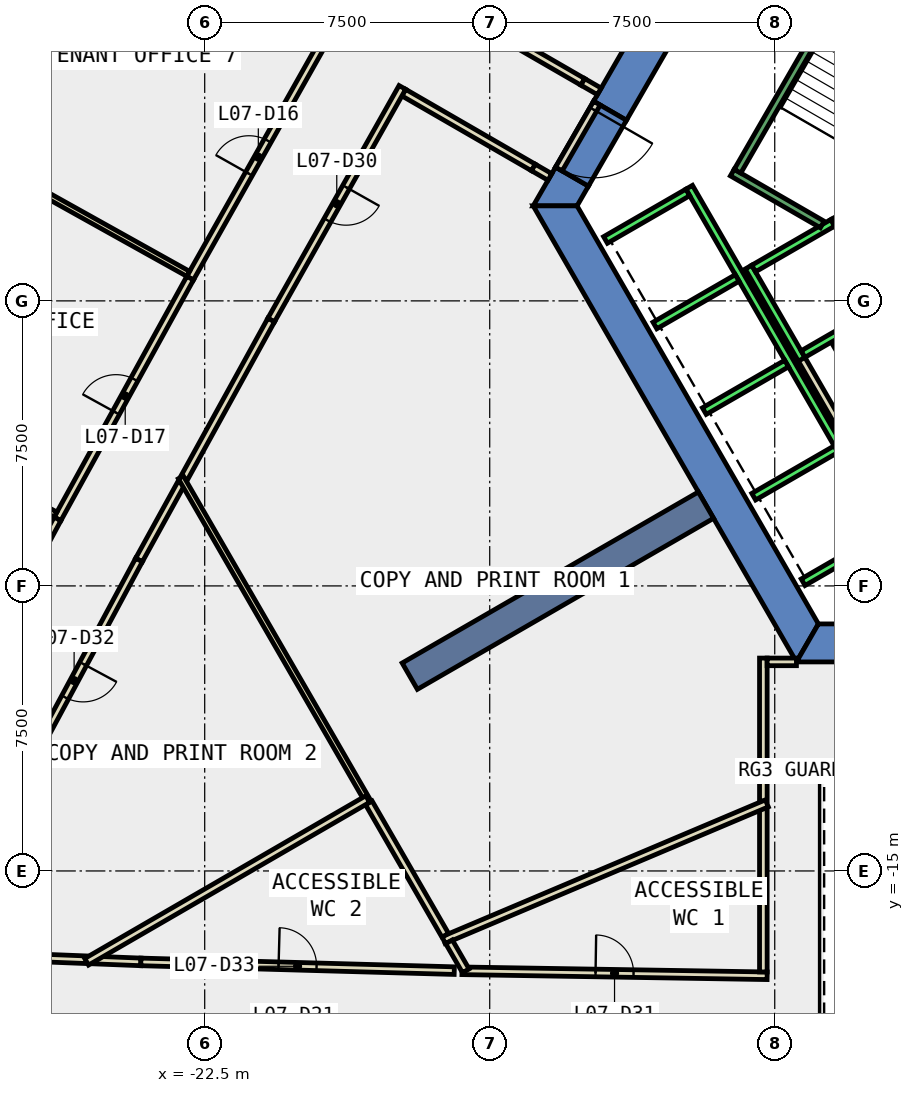
"""IFC4 building model, lengths in metres.
Left out: names, types, materials, properties, quantities, classifications, styles, units other than length and angle.
Written with IfcOpenShell. Run it as: python <this file> out.ifc"""

import sys

from ifc_helpers import new_model, si_unit, direction, frame, frame_2d, origin, place, context, subcontext, project, spatial, polyline, rectangle, outline, extrude, element, fill, save


model = new_model("IFC4")
c1 = context("Model", 3, precision=1e-05, world=origin(), true_north=direction((0.0, 1.0)))
c2 = subcontext(c1, "Body", "Model", "MODEL_VIEW")
j1 = project(units=[si_unit("LENGTHUNIT", "METRE"), si_unit("PLANEANGLEUNIT", "RADIAN")], contexts=[c1])
p1 = place(None, origin())
s1 = spatial("IfcSite", under=j1, at=p1, CompositionType="ELEMENT")
p2 = place(p1, origin())
s2 = spatial("IfcBuilding", under=s1, at=p2, CompositionType="ELEMENT")
p3 = place(p2, frame((0.0, 0.0, 39.2)))
s3 = spatial("IfcBuildingStorey", under=s2, at=p3, CompositionType="ELEMENT", Elevation=39.2)
p4 = place(p3, frame((0.0, 0.0, -0.4)))
e1 = element("IfcWall", 1, at=p4, inside=s3, PredefinedType="SHEAR", context=c2, shape_type="SweptSolid", body=[
    extrude(outline(polyline([(-12.267, 5.252), (-11.402, 4.752), (-6.351, 13.5), (-6.928, 14.5), (-12.267, 5.252)])), origin(), (0.0, 0.0, 1.0), 4.2),
])
p5 = place(p3, frame((0.0, 0.0, -0.4)))
e2 = element("IfcWall", 2, at=p5, inside=s3, PredefinedType="SHEAR", context=c2, shape_type="SweptSolid", body=[
    extrude(outline(polyline([(-12.402, 3.02), (-13.267, 3.52), (-13.856, 2.5), (-12.702, 2.5), (-12.402, 3.02)])), origin(), (0.0, 0.0, 1.0), 4.2),
])
p6 = place(p3, frame((0.0, 0.0, 3.6)))
e3 = element("IfcWall", 3, at=p6, inside=s3, PredefinedType="SHEAR", context=c2, shape_type="SweptSolid", body=[
    extrude(outline(polyline([(-13.267, 3.52), (-12.402, 3.02), (-11.402, 4.752), (-12.267, 5.252), (-13.267, 3.52)])), origin(), (0.0, 0.0, 1.0), 0.2),
])
p7 = place(p3, frame((0.0, 0.0, -0.4)))
e4 = element("IfcWall", 4, at=p7, inside=s3, PredefinedType="SHEAR", context=c2, shape_type="SweptSolid", body=[
    extrude(outline(polyline([(-13.856, 2.5), (-6.928, -9.5), (-6.351, -8.5), (-12.702, 2.5), (-13.856, 2.5)])), origin(), (0.0, 0.0, 1.0), 4.2),
])
p8 = place(p3, frame((0.0, 0.0, -0.4)))
e5 = element("IfcWall", 5, at=p8, inside=s3, PredefinedType="SHEAR", context=c2, shape_type="SweptSolid", body=[
    extrude(outline(polyline([(3.75, -9.5), (3.75, -8.5), (-6.351, -8.5), (-6.928, -9.5), (3.75, -9.5)])), origin(), (0.0, 0.0, 1.0), 4.2),
])
p9 = place(p3, frame((-9.31, -5.375, -0.4), z_axis=(0.0, 0.0, 1.0), x_axis=(-0.866017533419, -0.500013631625, 0.0)))
e6 = element("IfcWall", 6, at=p9, inside=s3, PredefinedType="SHEAR", context=c2, shape_type="SweptSolid", body=[
    extrude(rectangle(XDim=9.0, YDim=0.8, at=frame_2d((4.5, 0.0))), origin(), (0.0, 0.0, 1.0), 4.2),
])
p10 = place(p3, frame((-15.963, 7.733, 0.0), z_axis=(0.0, 0.0, 1.0), x_axis=(0.865965832374, -0.500103166518, 0.0)))
e7 = element("IfcWall", 7, at=p10, inside=s3, PredefinedType="PARTITIONING", context=c2, shape_type="SweptSolid", body=[
    extrude(rectangle(XDim=3.941, YDim=0.2, at=frame_2d((1.971, 0.0))), origin(), (0.0, 0.0, 1.0), 3.8),
])
p11 = place(p3, frame((-17.261, 5.48, 0.0), z_axis=(0.0, 0.0, 1.0), x_axis=(0.865949187497, -0.500131987253, 0.0)))
e8 = element("IfcWall", 8, at=p11, inside=s3, PredefinedType="PARTITIONING", context=c2, shape_type="SweptSolid", body=[
    extrude(rectangle(XDim=3.939, YDim=0.2, at=frame_2d((1.969, 0.0))), origin(), (0.0, 0.0, 1.0), 3.8),
])
p12 = place(p3, frame((-17.299, 5.617, 0.0), z_axis=(0.0, 0.0, 1.0), x_axis=(-0.491166441632, -0.871065741844, 0.0)))
e9 = element("IfcWall", 9, at=p12, inside=s3, PredefinedType="PARTITIONING", context=c2, shape_type="SweptSolid", body=[
    extrude(rectangle(XDim=7.028, YDim=0.2, at=frame_2d((3.514, 0.0))), origin(), (0.0, 0.0, 1.0), 3.8),
])
p13 = place(p12, frame((3.014, 0.0, 0.0)))
e10 = element("IfcOpeningElement", 10, at=p13, cuts=e9, PredefinedType="OPENING", context=c2, shape_type="SweptSolid", body=[
    extrude(rectangle(XDim=1.0, YDim=2.1, at=frame_2d((0.5, 1.05))), frame((0.0, 0.11, 0.0), z_axis=(0.0, -1.0, 0.0), x_axis=(1.0, 0.0, 0.0)), (0.0, 0.0, 1.0), 0.22),
])
p14 = place(p3, frame((-20.751, -0.505, 0.0), z_axis=(0.0, 0.0, 1.0), x_axis=(-0.482566110981, -0.875859548405, 0.0)))
e11 = element("IfcWall", 11, at=p14, inside=s3, PredefinedType="PARTITIONING", context=c2, shape_type="SweptSolid", body=[
    extrude(rectangle(XDim=4.748, YDim=0.2, at=frame_2d((2.374, 0.0))), origin(), (0.0, 0.0, 1.0), 3.8),
])
p15 = place(p3, frame((-15.73, -17.627, 0.0), z_axis=(0.0, 0.0, 1.0), x_axis=(0.999866746812, -0.016324479129, 0.0)))
e12 = element("IfcWall", 12, at=p15, inside=s3, PredefinedType="PARTITIONING", context=c2, shape_type="SweptSolid", body=[
    extrude(rectangle(XDim=8.031, YDim=0.2, at=frame_2d((4.016, 0.0))), origin(), (0.0, 0.0, 1.0), 3.8),
])
p16 = place(p15, frame((3.515, 0.0, 0.0)))
e13 = element("IfcOpeningElement", 13, at=p16, cuts=e12, PredefinedType="OPENING", context=c2, shape_type="SweptSolid", body=[
    extrude(rectangle(XDim=1.0, YDim=2.1, at=frame_2d((0.5, 1.05))), frame((0.0, 0.11, 0.0), z_axis=(0.0, -1.0, 0.0), x_axis=(1.0, 0.0, 0.0)), (0.0, 0.0, 1.0), 0.22),
])
p17 = place(p3, frame((-23.114, -4.794, 0.0), z_axis=(0.0, 0.0, 1.0), x_axis=(-0.482482362329, -0.875905685586, 0.0)))
e14 = element("IfcWall", 14, at=p17, inside=s3, PredefinedType="PARTITIONING", context=c2, shape_type="SweptSolid", body=[
    extrude(rectangle(XDim=2.311, YDim=0.2, at=frame_2d((1.156, 0.0))), origin(), (0.0, 0.0, 1.0), 3.8),
])
p18 = place(p3, frame((-24.229, -6.818, 0.0), z_axis=(0.0, 0.0, 1.0), x_axis=(-0.473714049803, -0.88067871498, 0.0)))
e15 = element("IfcWall", 15, at=p18, inside=s3, PredefinedType="PARTITIONING", context=c2, shape_type="SweptSolid", body=[
    extrude(rectangle(XDim=7.209, YDim=0.2, at=frame_2d((3.604, 0.0))), origin(), (0.0, 0.0, 1.0), 3.8),
])
p19 = place(p18, frame((3.104, 0.0, 0.0)))
e16 = element("IfcOpeningElement", 16, at=p19, cuts=e15, PredefinedType="OPENING", context=c2, shape_type="SweptSolid", body=[
    extrude(rectangle(XDim=1.0, YDim=2.1, at=frame_2d((0.5, 1.05))), frame((0.0, 0.11, 0.0), z_axis=(0.0, -1.0, 0.0), x_axis=(1.0, 0.0, 0.0)), (0.0, 0.0, 1.0), 0.22),
])
p20 = place(p3, frame((-29.639, -17.178, 0.0), z_axis=(0.0, 0.0, 1.0), x_axis=(0.999228076722, -0.039284229546, 0.0)))
e17 = element("IfcWall", 17, at=p20, inside=s3, PredefinedType="PARTITIONING", context=c2, shape_type="SweptSolid", body=[
    extrude(rectangle(XDim=4.021, YDim=0.2, at=frame_2d((2.01, 0.0))), origin(), (0.0, 0.0, 1.0), 3.8),
])
p21 = place(p3, frame((-25.421, -17.344, 0.0), z_axis=(0.0, 0.0, 1.0), x_axis=(0.999219068508, -0.039512695804, 0.0)))
e18 = element("IfcWall", 18, at=p21, inside=s3, PredefinedType="PARTITIONING", context=c2, shape_type="SweptSolid", body=[
    extrude(rectangle(XDim=1.242, YDim=0.2, at=frame_2d((0.621, 0.0))), origin(), (0.0, 0.0, 1.0), 3.8),
])
p22 = place(p3, frame((-24.18, -17.393, 0.0), z_axis=(0.0, 0.0, 1.0), x_axis=(0.999611380121, -0.02787631132, 0.0)))
e19 = element("IfcWall", 19, at=p22, inside=s3, PredefinedType="PARTITIONING", context=c2, shape_type="SweptSolid", body=[
    extrude(rectangle(XDim=8.25, YDim=0.2, at=frame_2d((4.125, 0.0))), origin(), (0.0, 0.0, 1.0), 3.8),
])
p23 = place(p22, frame((3.625, 0.0, 0.0)))
e20 = element("IfcOpeningElement", 20, at=p23, cuts=e19, PredefinedType="OPENING", context=c2, shape_type="SweptSolid", body=[
    extrude(rectangle(XDim=1.0, YDim=2.1, at=frame_2d((0.5, 1.05))), frame((0.0, 0.11, 0.0), z_axis=(0.0, -1.0, 0.0), x_axis=(1.0, 0.0, 0.0)), (0.0, 0.0, 1.0), 0.22),
])
p24 = place(p3, frame((-22.884, 0.598, 0.0), z_axis=(0.0, 0.0, 1.0), x_axis=(0.491206176175, 0.871043335597, 0.0)))
e21 = element("IfcWall", 21, at=p24, inside=s3, PredefinedType="PARTITIONING", context=c2, shape_type="SweptSolid", body=[
    extrude(rectangle(XDim=7.309, YDim=0.2, at=frame_2d((3.654, 0.0))), origin(), (0.0, 0.0, 1.0), 3.8),
])
p25 = place(p24, frame((3.154, 0.0, 0.0)))
e22 = element("IfcOpeningElement", 22, at=p25, cuts=e21, PredefinedType="OPENING", context=c2, shape_type="SweptSolid", body=[
    extrude(rectangle(XDim=1.0, YDim=2.1, at=frame_2d((0.5, 1.05))), frame((0.0, 0.11, 0.0), z_axis=(0.0, -1.0, 0.0), x_axis=(1.0, 0.0, 0.0)), (0.0, 0.0, 1.0), 0.22),
])
p26 = place(p3, frame((-26.373, -5.736, 0.0), z_axis=(0.0, 0.0, 1.0), x_axis=(0.482587313112, 0.875847866483, 0.0)))
e23 = element("IfcWall", 23, at=p26, inside=s3, PredefinedType="PARTITIONING", context=c2, shape_type="SweptSolid", body=[
    extrude(rectangle(XDim=7.232, YDim=0.2, at=frame_2d((3.616, 0.0))), origin(), (0.0, 0.0, 1.0), 3.8),
])
p27 = place(p26, frame((3.191, 0.0, 0.0)))
e24 = element("IfcOpeningElement", 24, at=p27, cuts=e23, PredefinedType="OPENING", context=c2, shape_type="SweptSolid", body=[
    extrude(rectangle(XDim=1.0, YDim=2.1, at=frame_2d((0.5, 1.05))), frame((0.0, 0.11, 0.0), z_axis=(0.0, -1.0, 0.0), x_axis=(1.0, 0.0, 0.0)), (0.0, 0.0, 1.0), 0.22),
])
p28 = place(p3, frame((-29.799, -12.106, 0.0), z_axis=(0.0, 0.0, 1.0), x_axis=(0.473681086062, 0.880696445268, 0.0)))
e25 = element("IfcWall", 25, at=p28, inside=s3, PredefinedType="PARTITIONING", context=c2, shape_type="SweptSolid", body=[
    extrude(rectangle(XDim=7.233, YDim=0.2, at=frame_2d((3.616, 0.0))), origin(), (0.0, 0.0, 1.0), 3.8),
])
p29 = place(p28, frame((3.191, 0.0, 0.0)))
e26 = element("IfcOpeningElement", 26, at=p29, cuts=e25, PredefinedType="OPENING", context=c2, shape_type="SweptSolid", body=[
    extrude(rectangle(XDim=1.0, YDim=2.1, at=frame_2d((0.5, 1.05))), frame((0.0, 0.11, 0.0), z_axis=(0.0, -1.0, 0.0), x_axis=(1.0, 0.0, 0.0)), (0.0, 0.0, 1.0), 0.22),
])
p30 = place(p3, frame((-5.126, -2.422, 0.0), z_axis=(0.0, 0.0, 1.0), x_axis=(-0.500062241894, 0.865989465428, 0.0)))
e27 = element("IfcWall", 27, at=p30, inside=s3, PredefinedType="PARTITIONING", context=c2, shape_type="SweptSolid", body=[
    extrude(rectangle(XDim=1.7, YDim=0.2, at=frame_2d((0.85, 0.0))), origin(), (0.0, 0.0, 1.0), 3.8),
])
p31 = place(p3, frame((-5.492, -3.788, 0.0), z_axis=(0.0, 0.0, 1.0), x_axis=(-0.500008949224, 0.866020236886, 0.0)))
e28 = element("IfcWall", 28, at=p31, inside=s3, PredefinedType="PARTITIONING", context=c2, shape_type="SweptSolid", body=[
    extrude(rectangle(XDim=2.68, YDim=0.2, at=frame_2d((1.34, 0.0))), origin(), (0.0, 0.0, 1.0), 3.8),
])
p32 = place(p3, frame((-7.8, -13.161, 0.0), z_axis=(0.0, 0.0, 1.0), x_axis=(0.0, 1.0, 0.0)))
e29 = element("IfcWall", 29, at=p32, inside=s3, PredefinedType="PARTITIONING", context=c2, shape_type="SweptSolid", body=[
    extrude(rectangle(XDim=3.762, YDim=0.2, at=frame_2d((1.881, 0.0))), origin(), (0.0, 0.0, 1.0), 3.8),
])
p33 = place(p3, frame((-7.7, -9.499, 0.0), z_axis=(0.0, 0.0, 1.0), x_axis=(1.0, 0.0, 0.0)))
e30 = element("IfcWall", 30, at=p33, inside=s3, PredefinedType="PARTITIONING", context=c2, shape_type="SweptSolid", body=[
    extrude(rectangle(XDim=0.771, YDim=0.2, at=frame_2d((0.385, 0.0))), origin(), (0.0, 0.0, 1.0), 3.8),
])
p34 = place(p3, frame((-7.8, -17.657, 0.0), z_axis=(0.0, 0.0, 1.0), x_axis=(0.0, 1.0, 0.0)))
e31 = element("IfcWall", 31, at=p34, inside=s3, PredefinedType="PARTITIONING", context=c2, shape_type="SweptSolid", body=[
    extrude(rectangle(XDim=4.296, YDim=0.2, at=frame_2d((2.148, 0.0))), origin(), (0.0, 0.0, 1.0), 3.8),
])
p35 = place(p3, frame((-7.708, -13.222, 0.0), z_axis=(0.0, 0.0, 1.0), x_axis=(-0.921093468555, -0.389341523839, 0.0)))
e32 = element("IfcWall", 32, at=p35, inside=s3, PredefinedType="PARTITIONING", context=c2, shape_type="SweptSolid", body=[
    extrude(rectangle(XDim=9.233, YDim=0.2, at=frame_2d((4.617, 0.0))), origin(), (0.0, 0.0, 1.0), 3.8),
])
p36 = place(p3, frame((-18.182, -13.207, 0.0), z_axis=(0.0, 0.0, 1.0), x_axis=(-0.500081416649, 0.865978392757, 0.0)))
e33 = element("IfcWall", 33, at=p36, inside=s3, PredefinedType="PARTITIONING", context=c2, shape_type="SweptSolid", body=[
    extrude(rectangle(XDim=9.89, YDim=0.15, at=frame_2d((4.945, 0.0))), origin(), (0.0, 0.0, 1.0), 3.8),
])
p37 = place(p3, frame((-16.171, -16.692, 0.0), z_axis=(0.0, 0.0, 1.0), x_axis=(-0.499813503007, 0.866133051102, 0.0)))
e34 = element("IfcWall", 34, at=p37, inside=s3, PredefinedType="PARTITIONING", context=c2, shape_type="SweptSolid", body=[
    extrude(rectangle(XDim=4.023, YDim=0.2, at=frame_2d((2.012, 0.0))), origin(), (0.0, 0.0, 1.0), 3.8),
])
p38 = place(p3, frame((-15.63, -17.628, 0.0), z_axis=(0.0, 0.0, 1.0), x_axis=(-0.500577563191, 0.865691690632, 0.0)))
e35 = element("IfcWall", 35, at=p38, inside=s3, PredefinedType="PARTITIONING", context=c2, shape_type="SweptSolid", body=[
    extrude(rectangle(XDim=0.881, YDim=0.2, at=frame_2d((0.441, 0.0))), origin(), (0.0, 0.0, 1.0), 3.8),
])
p39 = place(p3, frame((-18.211, -13.108, 0.0), z_axis=(0.0, 0.0, 1.0), x_axis=(-0.865421721769, -0.501044153235, 0.0)))
e36 = element("IfcWall", 36, at=p39, inside=s3, PredefinedType="PARTITIONING", context=c2, shape_type="SweptSolid", body=[
    extrude(rectangle(XDim=8.546, YDim=0.2, at=frame_2d((4.273, 0.0))), origin(), (0.0, 0.0, 1.0), 3.8),
])
p40 = place(p3, frame((-22.935, 0.712, 0.0), z_axis=(0.0, 0.0, 1.0), x_axis=(-0.873395616379, 0.487011393389, 0.0)))
e37 = element("IfcWall", 37, at=p40, inside=s3, PredefinedType="PARTITIONING", context=c2, shape_type="SweptSolid", body=[
    extrude(rectangle(XDim=6.48, YDim=0.15, at=frame_2d((3.24, 0.0))), origin(), (0.0, 0.0, 1.0), 3.8),
])
p41 = place(p3, frame((-26.425, -5.623, 0.0), z_axis=(0.0, 0.0, 1.0), x_axis=(-0.87825523631, 0.478192157919, 0.0)))
e38 = element("IfcWall", 38, at=p41, inside=s3, PredefinedType="PARTITIONING", context=c2, shape_type="SweptSolid", body=[
    extrude(rectangle(XDim=6.481, YDim=0.15, at=frame_2d((3.24, 0.0))), origin(), (0.0, 0.0, 1.0), 3.8),
])
p42 = place(p3, frame((-12.18, 5.202, 0.0), z_axis=(0.0, 0.0, 1.0), x_axis=(-0.50002537861, -0.866010750942, 0.0)))
e39 = element("IfcWall", 39, at=p42, inside=s3, PredefinedType="PARTITIONING", context=c2, shape_type="SweptSolid", body=[
    extrude(rectangle(XDim=2.0, YDim=0.2, at=frame_2d((1.0, 0.0))), origin(), (0.0, 0.0, 1.0), 2.4),
])
p43 = place(p42, frame((0.19, 0.0, 0.0)))
e40 = element("IfcOpeningElement", 40, at=p43, cuts=e39, PredefinedType="OPENING", context=c2, shape_type="SweptSolid", body=[
    extrude(rectangle(XDim=1.8, YDim=2.1, at=frame_2d((0.9, 1.05))), frame((0.0, 0.11, 0.0), z_axis=(0.0, -1.0, 0.0), x_axis=(1.0, 0.0, 0.0)), (0.0, 0.0, 1.0), 0.22),
])
for number, where, z_axis, x_axis in (
    (41, (-12.55, 5.762, 0.0), (0.0, 0.0, 1.0), (0.866, -0.5, 0.0)),
    (42, (-13.85, 3.51, 0.0), (0.0, 0.0, 1.0), (0.866, -0.5, 0.0)),
):
    element("IfcWall", number, at=place(p3, frame(where, z_axis=z_axis, x_axis=x_axis)), inside=s3, PredefinedType="PARTITIONING", context=c2, shape_type="SweptSolid", body=[
        extrude(rectangle(XDim=0.5, YDim=0.2, at=frame_2d((0.25, 0.0))), origin(), (0.0, 0.0, 1.0), 2.4),
    ])
p44 = place(p3, frame((-5.94, 2.188, 0.0), z_axis=(0.0, 0.0, 1.0), x_axis=(0.49994636267, -0.866056369097, 0.0)))
e43 = element("IfcWall", 43, at=p44, inside=s3, PredefinedType="STANDARD", context=c2, shape_type="SweptSolid", body=[
    extrude(rectangle(XDim=2.8, YDim=0.2, at=frame_2d((1.4, 0.0))), origin(), (0.0, 0.0, 1.0), 3.8),
])
p45 = place(p44, frame((1.225, 0.0, 0.0)))
e44 = element("IfcOpeningElement", 44, at=p45, cuts=e43, PredefinedType="OPENING", context=c2, shape_type="SweptSolid", body=[
    extrude(rectangle(XDim=1.1, YDim=2.1, at=frame_2d((0.55, 1.05))), frame((0.0, 0.11, 0.0), z_axis=(0.0, -1.0, 0.0), x_axis=(1.0, 0.0, 0.0)), (0.0, 0.0, 1.0), 0.22),
])
p46 = place(p3, frame((-8.192, 0.888, 0.0), z_axis=(0.0, 0.0, 1.0), x_axis=(0.49994636267, -0.866056369097, 0.0)))
e45 = element("IfcWall", 45, at=p46, inside=s3, PredefinedType="STANDARD", context=c2, shape_type="SweptSolid", body=[
    extrude(rectangle(XDim=2.8, YDim=0.2, at=frame_2d((1.4, 0.0))), origin(), (0.0, 0.0, 1.0), 3.8),
])
for number, where, z_axis, x_axis in (
    (46, (-5.977, 2.052, 0.0), (0.0, 0.0, 1.0), (-0.866, -0.5, 0.0)),
    (47, (-4.677, -0.2, 0.0), (0.0, 0.0, 1.0), (-0.866, -0.5, 0.0)),
):
    element("IfcWall", number, at=place(p3, frame(where, z_axis=z_axis, x_axis=x_axis)), inside=s3, PredefinedType="STANDARD", context=c2, shape_type="SweptSolid", body=[
        extrude(rectangle(XDim=2.399, YDim=0.2, at=frame_2d((1.2, 0.0))), origin(), (0.0, 0.0, 1.0), 3.8),
    ])
p47 = place(p3, frame((-9.751, 2.99, 0.0), z_axis=(0.0, 0.0, 1.0), x_axis=(0.50000090737, -0.866024879913, 0.0)))
e48 = element("IfcWall", 48, at=p47, inside=s3, PredefinedType="STANDARD", context=c2, shape_type="SweptSolid", body=[
    extrude(rectangle(XDim=10.6, YDim=0.2, at=frame_2d((5.3, 0.0))), origin(), (0.0, 0.0, 1.0), 3.8),
])
p48 = place(p3, frame((-9.788, 2.853, 0.0), z_axis=(0.0, 0.0, 1.0), x_axis=(-0.865998541277, -0.500046524342, 0.0)))
e49 = element("IfcWall", 49, at=p48, inside=s3, PredefinedType="STANDARD", context=c2, shape_type="SweptSolid", body=[
    extrude(rectangle(XDim=2.5, YDim=0.2, at=frame_2d((1.25, 0.0))), origin(), (0.0, 0.0, 1.0), 3.8),
])
for number, where, z_axis, x_axis in (
    (50, (-8.488, 0.602, 0.0), (0.0, 0.0, 1.0), (-0.866, -0.5, 0.0)),
    (51, (-7.188, -1.65, 0.0), (0.0, 0.0, 1.0), (-0.866, -0.5, 0.0)),
    (52, (-5.888, -3.902, 0.0), (0.0, 0.0, 1.0), (-0.866, -0.5, 0.0)),
    (53, (-4.588, -6.153, 0.0), (0.0, 0.0, 1.0), (-0.866, -0.5, 0.0)),
):
    element("IfcWall", number, at=place(p3, frame(where, z_axis=z_axis, x_axis=x_axis)), inside=s3, PredefinedType="STANDARD", context=c2, shape_type="SweptSolid", body=[
        extrude(rectangle(XDim=2.5, YDim=0.2, at=frame_2d((1.25, 0.0))), origin(), (0.0, 0.0, 1.0), 3.8),
    ])
p49 = place(p3, frame((-6.25, 2.01, 0.0), z_axis=(0.0, 0.0, 1.0), x_axis=(-0.86611865017, 0.499838457731, 0.0)))
e54 = element("IfcWall", 54, at=p49, inside=s3, PredefinedType="STANDARD", context=c2, shape_type="SweptSolid", body=[
    extrude(rectangle(XDim=2.733, YDim=0.2, at=frame_2d((1.366, 0.0))), origin(), (0.0, 0.0, 1.0), 3.8),
])
p50 = place(p3, frame((-5.03, 9.388, 0.0), z_axis=(0.0, 0.0, 1.0), x_axis=(-0.499978703459, -0.866037698999, 0.0)))
e55 = element("IfcWall", 55, at=p50, inside=s3, PredefinedType="STANDARD", context=c2, shape_type="SweptSolid", body=[
    extrude(rectangle(XDim=6.9, YDim=0.2, at=frame_2d((3.45, 0.0))), origin(), (0.0, 0.0, 1.0), 3.8),
])
p51 = place(p25, origin())
e56 = element("IfcDoor", 56, at=p51, inside=s3, OperationType="SINGLE_SWING_RIGHT", PredefinedType="DOOR", context=c2, shape_type="SweptSolid", body=[
    extrude(rectangle(XDim=1.0, YDim=2.1, at=frame_2d((0.5, 1.05))), frame((0.0, 0.025, 0.0), z_axis=(0.0, -1.0, 0.0), x_axis=(1.0, 0.0, 0.0)), (0.0, 0.0, 1.0), 0.05),
])
fill(e22, e56)
p52 = place(p27, origin())
e57 = element("IfcDoor", 57, at=p52, inside=s3, OperationType="SINGLE_SWING_LEFT", PredefinedType="DOOR", context=c2, shape_type="SweptSolid", body=[
    extrude(rectangle(XDim=1.0, YDim=2.1, at=frame_2d((0.5, 1.05))), frame((0.0, 0.025, 0.0), z_axis=(0.0, -1.0, 0.0), x_axis=(1.0, 0.0, 0.0)), (0.0, 0.0, 1.0), 0.05),
])
fill(e24, e57)
p53 = place(p13, origin())
e58 = element("IfcDoor", 58, at=p53, inside=s3, OperationType="SINGLE_SWING_RIGHT", PredefinedType="DOOR", context=c2, shape_type="SweptSolid", body=[
    extrude(rectangle(XDim=1.0, YDim=2.1, at=frame_2d((0.5, 1.05))), frame((0.0, 0.025, 0.0), z_axis=(0.0, -1.0, 0.0), x_axis=(1.0, 0.0, 0.0)), (0.0, 0.0, 1.0), 0.05),
])
fill(e10, e58)
p54 = place(p16, origin())
e59 = element("IfcDoor", 59, at=p54, inside=s3, OperationType="SINGLE_SWING_LEFT", PredefinedType="DOOR", context=c2, shape_type="SweptSolid", body=[
    extrude(rectangle(XDim=1.0, YDim=2.1, at=frame_2d((0.5, 1.05))), frame((0.0, 0.025, 0.0), z_axis=(0.0, -1.0, 0.0), x_axis=(1.0, 0.0, 0.0)), (0.0, 0.0, 1.0), 0.05),
])
fill(e13, e59)
p55 = place(p19, origin())
e60 = element("IfcDoor", 60, at=p55, inside=s3, OperationType="SINGLE_SWING_RIGHT", PredefinedType="DOOR", context=c2, shape_type="SweptSolid", body=[
    extrude(rectangle(XDim=1.0, YDim=2.1, at=frame_2d((0.5, 1.05))), frame((0.0, 0.025, 0.0), z_axis=(0.0, -1.0, 0.0), x_axis=(1.0, 0.0, 0.0)), (0.0, 0.0, 1.0), 0.05),
])
fill(e16, e60)
p56 = place(p23, origin())
e61 = element("IfcDoor", 61, at=p56, inside=s3, OperationType="SINGLE_SWING_RIGHT", PredefinedType="DOOR", context=c2, shape_type="SweptSolid", body=[
    extrude(rectangle(XDim=1.0, YDim=2.1, at=frame_2d((0.5, 1.05))), frame((0.0, 0.025, 0.0), z_axis=(0.0, -1.0, 0.0), x_axis=(1.0, 0.0, 0.0)), (0.0, 0.0, 1.0), 0.05),
])
fill(e20, e61)
p57 = place(p43, origin())
e62 = element("IfcDoor", 62, at=p57, inside=s3, OperationType="DOUBLE_DOOR_SINGLE_SWING", PredefinedType="DOOR", context=c2, shape_type="SweptSolid", body=[
    extrude(rectangle(XDim=1.8, YDim=2.1, at=frame_2d((0.9, 1.05))), frame((0.0, 0.025, 0.0), z_axis=(0.0, -1.0, 0.0), x_axis=(1.0, 0.0, 0.0)), (0.0, 0.0, 1.0), 0.05),
])
fill(e40, e62)
save(model, sys.argv[1])
